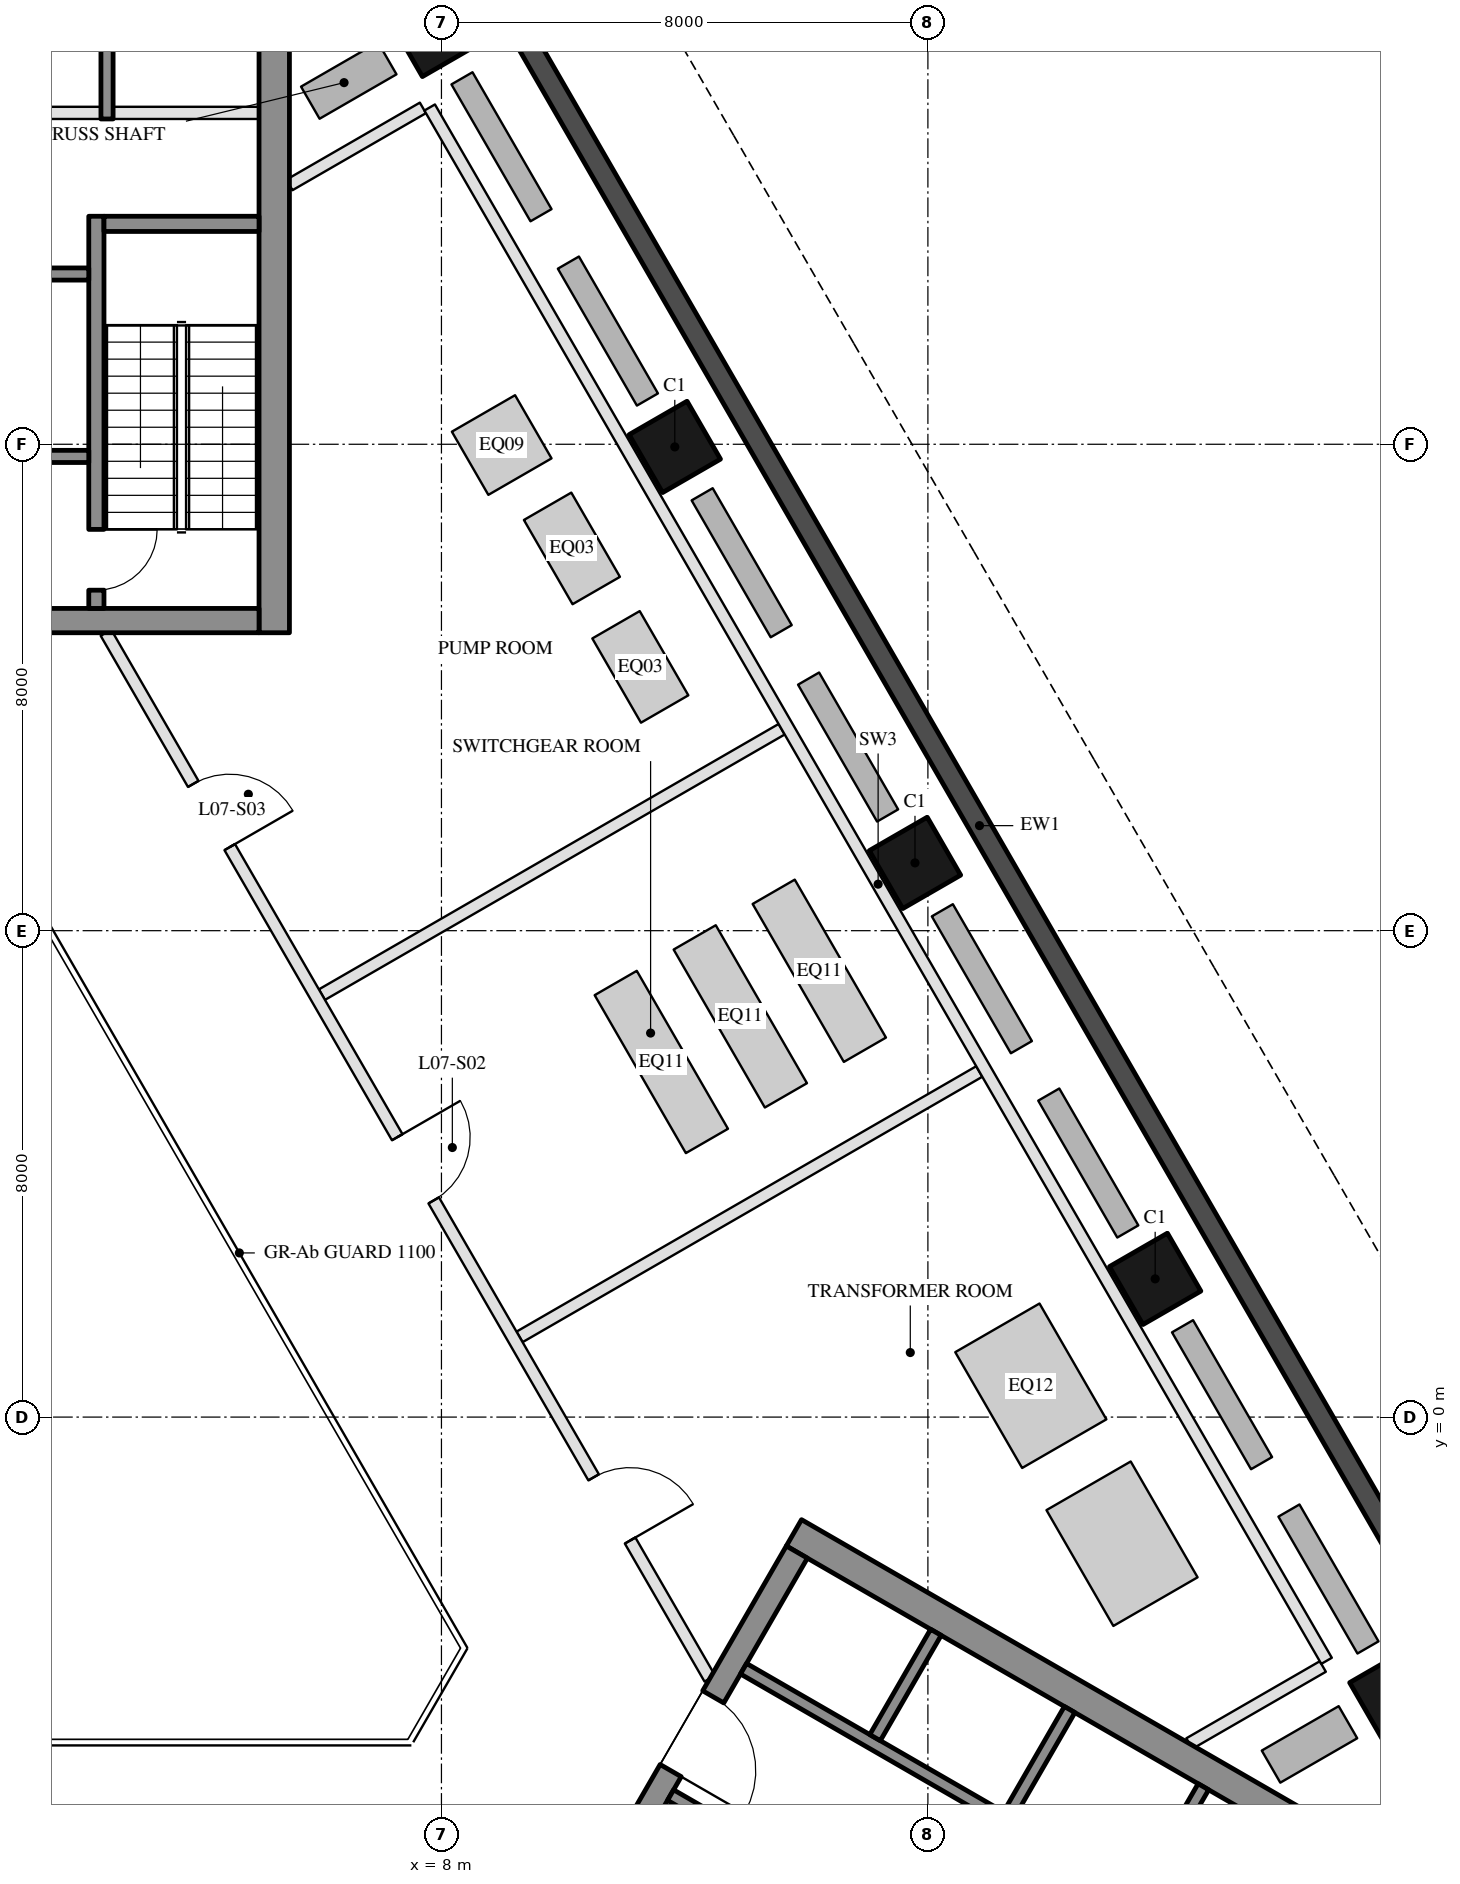
"""IFC4 building model, lengths in metres.
Left out: names, types, materials, properties, quantities, classifications, styles, units other than length and angle.
Written with IfcOpenShell. Run it as: python <this file> out.ifc"""

import sys

from ifc_helpers import new_model, si_unit, direction, frame, frame_2d, origin, origin_2d, place, context, subcontext, project, spatial, rectangle, hollow_rectangle, extrude, element, fill, save


model = new_model("IFC4")
c1 = context("Model", 3, precision=1e-05, world=origin(), true_north=direction((0.0, 1.0)))
c2 = subcontext(c1, "Body", "Model", "MODEL_VIEW")
j1 = project(units=[si_unit("LENGTHUNIT", "METRE"), si_unit("PLANEANGLEUNIT", "RADIAN")], contexts=[c1])
p1 = place(None, origin())
s1 = spatial("IfcSite", under=j1, at=p1, CompositionType="ELEMENT")
p2 = place(p1, origin())
s2 = spatial("IfcBuilding", under=s1, at=p2, CompositionType="ELEMENT")
p3 = place(p2, frame((0.0, 0.0, 42.0)))
s3 = spatial("IfcBuildingStorey", under=s2, at=p3, CompositionType="ELEMENT", Elevation=42.0)
for number, where, z_axis, x_axis in (
    (1, (23.688, -4.568, 0.0), (0.0, 0.0, 1.0), (-0.5, 0.866, 0.0)),
    (2, (19.738, 2.273, 0.0), (0.0, 0.0, 1.0), (-0.5, 0.866, 0.0)),
    (3, (15.788, 9.115, 0.0), (0.0, 0.0, 1.0), (-0.5, 0.866, 0.0)),
    (4, (11.838, 15.957, 0.0), (0.0, 0.0, 1.0), (-0.5, 0.866, 0.0)),
    (5, (7.888, 22.798, 0.0), (0.0, 0.0, 1.0), (-0.5, 0.866, 0.0)),
):
    element("IfcColumn", number, at=place(p3, frame(where, z_axis=z_axis, x_axis=x_axis)), inside=s3, PredefinedType="COLUMN", context=c2, shape_type="SweptSolid", body=[
        extrude(hollow_rectangle(XDim=1.1, YDim=1.1, WallThickness=0.05, at=origin_2d()), origin(), (0.0, 0.0, 1.0), 4.5),
    ])
p4 = place(p3, frame((26.256, -6.567, 0.0), z_axis=(0.0, 0.0, 1.0), x_axis=(-0.499998380999, 0.866026338513, 0.0)))
e6 = element("IfcWall", 6, at=p4, inside=s3, PredefinedType="SOLIDWALL", context=c2, shape_type="SweptSolid", body=[
    extrude(rectangle(XDim=37.631, YDim=0.35, at=frame_2d((18.816, 0.0))), origin(), (0.0, 0.0, 1.0), 4.35),
])
p5 = place(p3, frame((5.25, 12.9, 0.0), z_axis=(0.0, 0.0, 1.0), x_axis=(0.0, 1.0, 0.0)))
e7 = element("IfcWall", 7, at=p5, inside=s3, PredefinedType="SHEAR", context=c2, shape_type="SweptSolid", body=[
    extrude(rectangle(XDim=14.837, YDim=0.5, at=frame_2d((7.418, 0.0))), origin(), (0.0, 0.0, 1.0), 4.3),
])
p6 = place(p3, frame((5.0, 13.1, 0.0), z_axis=(0.0, 0.0, 1.0), x_axis=(-1.0, 0.0, 0.0)))
e8 = element("IfcWall", 8, at=p6, inside=s3, PredefinedType="SHEAR", context=c2, shape_type="SweptSolid", body=[
    extrude(rectangle(XDim=10.0, YDim=0.4, at=frame_2d((5.0, 0.0))), origin(), (0.0, 0.0, 1.0), 4.3),
])
p7 = place(p6, frame((3.55, 0.0, 0.0)))
e9 = element("IfcOpeningElement", 9, at=p7, cuts=e8, PredefinedType="OPENING", context=c2, shape_type="SweptSolid", body=[
    extrude(rectangle(XDim=1.1, YDim=2.1, at=frame_2d((0.55, 1.05))), frame((0.0, 0.21, 0.0), z_axis=(0.0, -1.0, 0.0), x_axis=(1.0, 0.0, 0.0)), (0.0, 0.0, 1.0), 0.42),
])
p8 = place(p6, frame((5.85, 0.0, 0.0)))
e10 = element("IfcOpeningElement", 10, at=p8, cuts=e8, PredefinedType="OPENING", context=c2, shape_type="SweptSolid", body=[
    extrude(rectangle(XDim=1.4, YDim=2.1, at=frame_2d((0.7, 1.05))), frame((0.0, 0.21, 0.0), z_axis=(0.0, -1.0, 0.0), x_axis=(1.0, 0.0, 0.0)), (0.0, 0.0, 1.0), 0.42),
])
p9 = place(p3, frame((2.325, 13.3, 0.0), z_axis=(0.0, 0.0, 1.0), x_axis=(0.0, 1.0, 0.0)))
e11 = element("IfcWall", 11, at=p9, inside=s3, PredefinedType="SHEAR", context=c2, shape_type="SweptSolid", body=[
    extrude(rectangle(XDim=6.45, YDim=0.25, at=frame_2d((3.225, 0.0))), origin(), (0.0, 0.0, 1.0), 4.3),
])
p10 = place(p9, frame((0.3, 0.0, 0.0)))
e12 = element("IfcOpeningElement", 12, at=p10, cuts=e11, PredefinedType="OPENING", context=c2, shape_type="SweptSolid", body=[
    extrude(rectangle(XDim=1.0, YDim=2.1, at=frame_2d((0.5, 1.05))), frame((0.0, 0.135, 0.0), z_axis=(0.0, -1.0, 0.0), x_axis=(1.0, 0.0, 0.0)), (0.0, 0.0, 1.0), 0.27),
])
p11 = place(p3, frame((5.0, 19.625, 0.0), z_axis=(0.0, 0.0, 1.0), x_axis=(-1.0, 0.0, 0.0)))
e13 = element("IfcWall", 13, at=p11, inside=s3, PredefinedType="SHEAR", context=c2, shape_type="SweptSolid", body=[
    extrude(rectangle(XDim=2.55, YDim=0.25, at=frame_2d((1.275, 0.0))), origin(), (0.0, 0.0, 1.0), 4.3),
])
p12 = place(p3, frame((2.2, 18.8, 0.0), z_axis=(0.0, 0.0, 1.0), x_axis=(-1.0, 0.0, 0.0)))
e14 = element("IfcWall", 14, at=p12, inside=s3, PredefinedType="SHEAR", context=c2, shape_type="SweptSolid", body=[
    extrude(rectangle(XDim=2.8, YDim=0.2, at=frame_2d((1.4, 0.0))), origin(), (0.0, 0.0, 1.0), 4.3),
])
p13 = place(p3, frame((2.2, 15.8, 0.0), z_axis=(0.0, 0.0, 1.0), x_axis=(-1.0, 0.0, 0.0)))
e15 = element("IfcWall", 15, at=p13, inside=s3, PredefinedType="SHEAR", context=c2, shape_type="SweptSolid", body=[
    extrude(rectangle(XDim=2.8, YDim=0.2, at=frame_2d((1.4, 0.0))), origin(), (0.0, 0.0, 1.0), 4.3),
])
p14 = place(p13, frame((0.7, 0.0, 0.0)))
e16 = element("IfcOpeningElement", 16, at=p14, cuts=e15, PredefinedType="OPENING", context=c2, shape_type="SweptSolid", body=[
    extrude(rectangle(XDim=1.2, YDim=2.1, at=frame_2d((0.6, 1.05))), frame((0.0, 0.11, 0.0), z_axis=(0.0, -1.0, 0.0), x_axis=(1.0, 0.0, 0.0)), (0.0, 0.0, 1.0), 0.22),
])
p15 = place(p3, frame((2.5, 21.35, 0.0), z_axis=(0.0, 0.0, 1.0), x_axis=(0.0, 1.0, 0.0)))
e17 = element("IfcWall", 17, at=p15, inside=s3, PredefinedType="SHEAR", context=c2, shape_type="SweptSolid", body=[
    extrude(rectangle(XDim=2.8, YDim=0.2, at=frame_2d((1.4, 0.0))), origin(), (0.0, 0.0, 1.0), 4.3),
])
p16 = place(p3, frame((5.0, 21.45, 0.0), z_axis=(0.0, 0.0, 1.0), x_axis=(-1.0, 0.0, 0.0)))
e18 = element("IfcWall", 18, at=p16, inside=s3, PredefinedType="PARTITIONING", context=c2, shape_type="SweptSolid", body=[
    extrude(rectangle(XDim=2.4, YDim=0.2, at=frame_2d((1.2, 0.0))), origin(), (0.0, 0.0, 1.0), 4.3),
])
p17 = place(p3, frame((2.4, 21.45, 0.0), z_axis=(0.0, 0.0, 1.0), x_axis=(-1.0, 0.0, 0.0)))
e19 = element("IfcWall", 19, at=p17, inside=s3, PredefinedType="PARTITIONING", context=c2, shape_type="SweptSolid", body=[
    extrude(rectangle(XDim=2.8, YDim=0.2, at=frame_2d((1.4, 0.0))), origin(), (0.0, 0.0, 1.0), 4.3),
])
p18 = place(p3, frame((13.797, -1.903, 0.0), z_axis=(0.0, 0.0, 1.0), x_axis=(0.866025009528, -0.500000682871, 0.0)))
e20 = element("IfcWall", 20, at=p18, inside=s3, PredefinedType="SHEAR", context=c2, shape_type="SweptSolid", body=[
    extrude(rectangle(XDim=14.837, YDim=0.5, at=frame_2d((7.418, 0.0))), origin(), (0.0, 0.0, 1.0), 4.3),
])
p19 = place(p3, frame((8.845, -10.88, 0.0), z_axis=(0.0, 0.0, 1.0), x_axis=(0.500004234368, 0.866022959057, 0.0)))
e21 = element("IfcWall", 21, at=p19, inside=s3, PredefinedType="SHEAR", context=c2, shape_type="SweptSolid", body=[
    extrude(rectangle(XDim=10.0, YDim=0.4, at=frame_2d((5.0, 0.0))), origin(), (0.0, 0.0, 1.0), 4.3),
])
p20 = place(p19, frame((3.55, 0.0, 0.0)))
e22 = element("IfcOpeningElement", 22, at=p20, cuts=e21, PredefinedType="OPENING", context=c2, shape_type="SweptSolid", body=[
    extrude(rectangle(XDim=1.1, YDim=2.1, at=frame_2d((0.55, 1.05))), frame((0.0, 0.21, 0.0), z_axis=(0.0, -1.0, 0.0), x_axis=(1.0, 0.0, 0.0)), (0.0, 0.0, 1.0), 0.42),
])
p21 = place(p19, frame((5.85, 0.0, 0.0)))
e23 = element("IfcOpeningElement", 23, at=p21, cuts=e21, PredefinedType="OPENING", context=c2, shape_type="SweptSolid", body=[
    extrude(rectangle(XDim=1.4, YDim=2.1, at=frame_2d((0.7, 1.05))), frame((0.0, 0.21, 0.0), z_axis=(0.0, -1.0, 0.0), x_axis=(1.0, 0.0, 0.0)), (0.0, 0.0, 1.0), 0.42),
])
p22 = place(p3, frame((11.768, -6.217, 0.0), z_axis=(0.0, 0.0, 1.0), x_axis=(0.866050077142, -0.499957262057, 0.0)))
e24 = element("IfcWall", 24, at=p22, inside=s3, PredefinedType="SHEAR", context=c2, shape_type="SweptSolid", body=[
    extrude(rectangle(XDim=2.4, YDim=0.2, at=frame_2d((1.2, 0.0))), origin(), (0.0, 0.0, 1.0), 4.3),
])
p23 = place(p3, frame((12.968, -4.138, 0.0), z_axis=(0.0, 0.0, 1.0), x_axis=(0.866028328073, -0.49999493495, 0.0)))
e25 = element("IfcWall", 25, at=p23, inside=s3, PredefinedType="SHEAR", context=c2, shape_type="SweptSolid", body=[
    extrude(rectangle(XDim=10.16, YDim=0.2, at=frame_2d((5.08, 0.0))), origin(), (0.0, 0.0, 1.0), 4.3),
])
for number, where, z_axis, x_axis in (
    (26, (15.131, -5.272, 0.0), (0.0, 0.0, 1.0), (0.5, 0.866, 0.0)),
    (27, (17.331, -6.542, 0.0), (0.0, 0.0, 1.0), (0.5, 0.866, 0.0)),
    (28, (19.531, -7.812, 0.0), (0.0, 0.0, 1.0), (0.5, 0.866, 0.0)),
):
    element("IfcWall", number, at=place(p3, frame(where, z_axis=z_axis, x_axis=x_axis)), inside=s3, PredefinedType="SHEAR", context=c2, shape_type="SweptSolid", body=[
        extrude(rectangle(XDim=2.0, YDim=0.2, at=frame_2d((1.0, 0.0))), origin(), (0.0, 0.0, 1.0), 4.3),
    ])
p24 = place(p3, frame((22.495, -4.102, 0.0), z_axis=(0.0, 0.0, 1.0), x_axis=(-0.866065287345, -0.499930913282, 0.0)))
e29 = element("IfcWall", 29, at=p24, inside=s3, PredefinedType="PARTITIONING", context=c2, shape_type="SweptSolid", body=[
    extrude(rectangle(XDim=2.534, YDim=0.2, at=frame_2d((1.267, 0.0))), origin(), (0.0, 0.0, 1.0), 4.35),
])
for number, where, z_axis, x_axis in (
    (30, (16.845, 5.684, 0.0), (0.0, 0.0, 1.0), (-0.866, -0.5, 0.0)),
    (31, (13.595, 11.313, 0.0), (0.0, 0.0, 1.0), (-0.866, -0.5, 0.0)),
):
    element("IfcWall", number, at=place(p3, frame(where, z_axis=z_axis, x_axis=x_axis)), inside=s3, PredefinedType="PARTITIONING", context=c2, shape_type="SweptSolid", body=[
        extrude(rectangle(XDim=8.73, YDim=0.2, at=frame_2d((4.365, 0.0))), origin(), (0.0, 0.0, 1.0), 4.35),
    ])
p25 = place(p3, frame((7.695, 21.532, 0.0), z_axis=(0.0, 0.0, 1.0), x_axis=(-0.865999496279, -0.500044870432, 0.0)))
e32 = element("IfcWall", 32, at=p25, inside=s3, PredefinedType="PARTITIONING", context=c2, shape_type="SweptSolid", body=[
    extrude(rectangle(XDim=2.534, YDim=0.2, at=frame_2d((1.267, 0.0))), origin(), (0.0, 0.0, 1.0), 4.35),
])
p26 = place(p3, frame((22.556, -4.009, 0.0), z_axis=(0.0, 0.0, 1.0), x_axis=(-0.500002084189, 0.866024200474, 0.0)))
e33 = element("IfcWall", 33, at=p26, inside=s3, PredefinedType="PARTITIONING", context=c2, shape_type="SweptSolid", body=[
    extrude(rectangle(XDim=29.5, YDim=0.2, at=frame_2d((14.75, 0.0))), origin(), (0.0, 0.0, 1.0), 3.75),
])
p27 = place(p3, frame((12.413, -4.3, 0.0), z_axis=(0.0, 0.0, 1.0), x_axis=(-0.50000478328, 0.866022642139, 0.0)))
e34 = element("IfcWall", 34, at=p27, inside=s3, PredefinedType="PARTITIONING", context=c2, shape_type="SweptSolid", body=[
    extrude(rectangle(XDim=19.861, YDim=0.2, at=frame_2d((9.931, 0.0))), origin(), (0.0, 0.0, 1.0), 3.75),
])
p28 = place(p27, frame((2.621, 0.0, 0.0)))
e35 = element("IfcOpeningElement", 35, at=p28, cuts=e34, PredefinedType="OPENING", context=c2, shape_type="SweptSolid", body=[
    extrude(rectangle(XDim=1.2, YDim=2.1, at=frame_2d((0.6, 1.05))), frame((0.0, 0.11, 0.0), z_axis=(0.0, -1.0, 0.0), x_axis=(1.0, 0.0, 0.0)), (0.0, 0.0, 1.0), 0.22),
])
p29 = place(p27, frame((9.081, 0.0, 0.0)))
e36 = element("IfcOpeningElement", 36, at=p29, cuts=e34, PredefinedType="OPENING", context=c2, shape_type="SweptSolid", body=[
    extrude(rectangle(XDim=1.2, YDim=2.1, at=frame_2d((0.6, 1.05))), frame((0.0, 0.11, 0.0), z_axis=(0.0, -1.0, 0.0), x_axis=(1.0, 0.0, 0.0)), (0.0, 0.0, 1.0), 0.22),
])
p30 = place(p27, frame((15.79, 0.0, 0.0)))
e37 = element("IfcOpeningElement", 37, at=p30, cuts=e34, PredefinedType="OPENING", context=c2, shape_type="SweptSolid", body=[
    extrude(rectangle(XDim=1.2, YDim=2.1, at=frame_2d((0.6, 1.05))), frame((0.0, 0.11, 0.0), z_axis=(0.0, -1.0, 0.0), x_axis=(1.0, 0.0, 0.0)), (0.0, 0.0, 1.0), 0.22),
])
p31 = place(p10, frame((1.0, 0.0, 0.0), z_axis=(0.0, 0.0, 1.0), x_axis=(-1.0, 0.0, 0.0)))
e38 = element("IfcDoor", 38, at=p31, inside=s3, OperationType="SINGLE_SWING_LEFT", PredefinedType="DOOR", context=c2, shape_type="SweptSolid", body=[
    extrude(rectangle(XDim=1.0, YDim=2.1, at=frame_2d((0.5, 1.05))), frame((0.0, 0.025, 0.0), z_axis=(0.0, -1.0, 0.0), x_axis=(1.0, 0.0, 0.0)), (0.0, 0.0, 1.0), 0.05),
])
fill(e12, e38)
p32 = place(p21, frame((1.4, 0.0, 0.0), z_axis=(0.0, 0.0, 1.0), x_axis=(-1.0, 0.0, 0.0)))
e39 = element("IfcDoor", 39, at=p32, inside=s3, OperationType="DOUBLE_DOOR_SINGLE_SWING", PredefinedType="DOOR", context=c2, shape_type="SweptSolid", body=[
    extrude(rectangle(XDim=1.4, YDim=2.1, at=frame_2d((0.7, 1.05))), frame((0.0, 0.025, 0.0), z_axis=(0.0, -1.0, 0.0), x_axis=(1.0, 0.0, 0.0)), (0.0, 0.0, 1.0), 0.05),
])
fill(e23, e39)
p33 = place(p28, frame((1.2, 0.0, 0.0), z_axis=(0.0, 0.0, 1.0), x_axis=(-1.0, 0.0, 0.0)))
e40 = element("IfcDoor", 40, at=p33, inside=s3, OperationType="SINGLE_SWING_RIGHT", PredefinedType="DOOR", context=c2, shape_type="SweptSolid", body=[
    extrude(rectangle(XDim=1.2, YDim=2.1, at=frame_2d((0.6, 1.05))), frame((0.0, 0.025, 0.0), z_axis=(0.0, -1.0, 0.0), x_axis=(1.0, 0.0, 0.0)), (0.0, 0.0, 1.0), 0.05),
])
fill(e35, e40)
p34 = place(p29, frame((1.2, 0.0, 0.0), z_axis=(0.0, 0.0, 1.0), x_axis=(-1.0, 0.0, 0.0)))
e41 = element("IfcDoor", 41, at=p34, inside=s3, OperationType="SINGLE_SWING_LEFT", PredefinedType="DOOR", context=c2, shape_type="SweptSolid", body=[
    extrude(rectangle(XDim=1.2, YDim=2.1, at=frame_2d((0.6, 1.05))), frame((0.0, 0.025, 0.0), z_axis=(0.0, -1.0, 0.0), x_axis=(1.0, 0.0, 0.0)), (0.0, 0.0, 1.0), 0.05),
])
fill(e36, e41)
p35 = place(p30, frame((1.2, 0.0, 0.0), z_axis=(0.0, 0.0, 1.0), x_axis=(-1.0, 0.0, 0.0)))
e42 = element("IfcDoor", 42, at=p35, inside=s3, OperationType="SINGLE_SWING_RIGHT", PredefinedType="DOOR", context=c2, shape_type="SweptSolid", body=[
    extrude(rectangle(XDim=1.2, YDim=2.1, at=frame_2d((0.6, 1.05))), frame((0.0, 0.025, 0.0), z_axis=(0.0, -1.0, 0.0), x_axis=(1.0, 0.0, 0.0)), (0.0, 0.0, 1.0), 0.05),
])
fill(e37, e42)
save(model, sys.argv[1])
